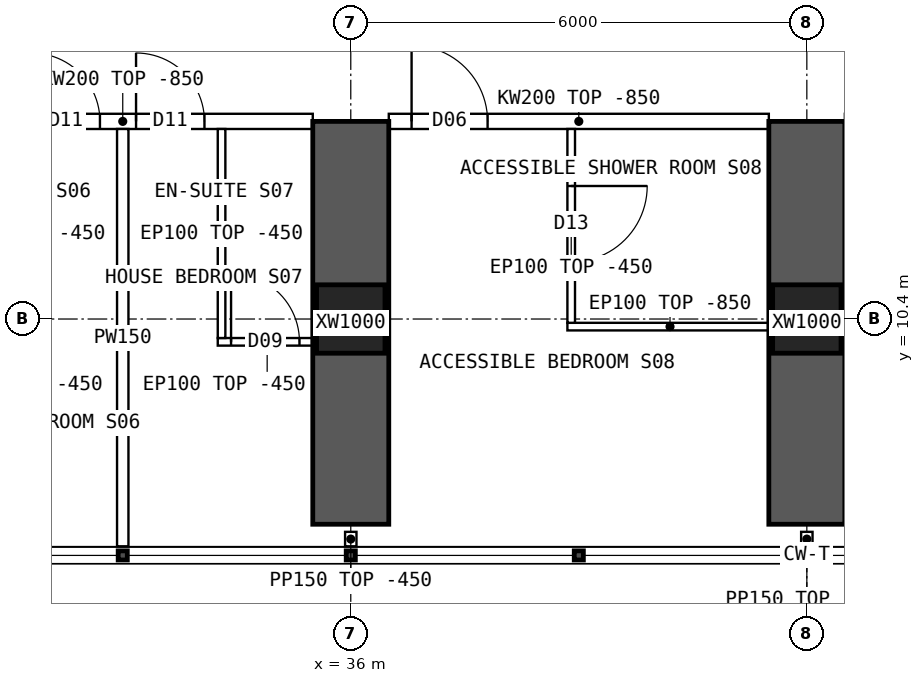
"""IFC4 building model, lengths in metres.
Left out: names, types, materials, properties, quantities, classifications, styles, units other than length and angle.
Written with IfcOpenShell. Run it as: python <this file> out.ifc"""

import sys

from ifc_helpers import new_model, si_unit, direction, frame, frame_2d, origin, origin_2d, place, context, subcontext, project, spatial, polyline, rectangle, hollow_rectangle, outline, extrude, element, fill, save


model = new_model("IFC4")
c1 = context("Model", 3, precision=1e-05, world=origin(), true_north=direction((0.0, 1.0)))
c2 = subcontext(c1, "Body", "Model", "MODEL_VIEW")
j1 = project(units=[si_unit("LENGTHUNIT", "METRE"), si_unit("PLANEANGLEUNIT", "RADIAN")], contexts=[c1])
p1 = place(None, origin())
s1 = spatial("IfcSite", under=j1, at=p1, CompositionType="ELEMENT")
p2 = place(p1, origin())
s2 = spatial("IfcBuilding", under=s1, at=p2, CompositionType="ELEMENT")
p3 = place(p2, frame((0.0, 0.0, 50.2)))
s3 = spatial("IfcBuildingStorey", under=s2, at=p3, CompositionType="ELEMENT", Elevation=50.2)
for number, where, z_axis, x_axis in (
    (1, (36.0, 10.4, 0.0), (0.0, 0.0, 1.0), (1.0, 0.0, 0.0)),
    (2, (42.0, 10.4, 0.0), (0.0, 0.0, 1.0), (1.0, 0.0, 0.0)),
):
    element("IfcColumn", number, at=place(p3, frame(where, z_axis=z_axis, x_axis=x_axis)), inside=s3, PredefinedType="COLUMN", context=c2, shape_type="SweptSolid", body=[
        extrude(hollow_rectangle(XDim=0.9, YDim=0.9, WallThickness=0.09, at=origin_2d()), origin(), (0.0, 0.0, 1.0), 3.75),
    ])
for number, where, z_axis, x_axis in (
    (3, (36.0, 7.7, 0.0), (0.0, 0.0, 1.0), (0.0, 1.0, 0.0)),
    (4, (42.0, 7.7, 0.0), (0.0, 0.0, 1.0), (0.0, 1.0, 0.0)),
):
    element("IfcWall", number, at=place(p3, frame(where, z_axis=z_axis, x_axis=x_axis)), inside=s3, PredefinedType="SHEAR", context=c2, shape_type="SweptSolid", body=[
        extrude(rectangle(XDim=5.3, YDim=1.0, at=frame_2d((2.65, 0.0))), origin(), (0.0, 0.0, 1.0), 3.75),
    ])
p4 = place(p3, frame((30.5, 13.0, 0.0), z_axis=(0.0, 0.0, 1.0), x_axis=(1.0, 0.0, 0.0)))
e5 = element("IfcWall", 5, at=p4, inside=s3, PredefinedType="SOLIDWALL", context=c2, shape_type="SweptSolid", body=[
    extrude(outline(polyline([(0.0, 0.0), (5.0, 0.0), (5.0, 2.9), (0.0, 2.9), (0.0, 0.0)])), frame((0.0, 0.1, 0.0), z_axis=(0.0, -1.0, 0.0), x_axis=(1.0, 0.0, 0.0)), (0.0, 0.0, 1.0), 0.2),
])
p5 = place(p4, frame((1.3, 0.0, 0.0)))
e6 = element("IfcOpeningElement", 6, at=p5, cuts=e5, PredefinedType="OPENING", context=c2, shape_type="SweptSolid", body=[
    extrude(rectangle(XDim=0.9, YDim=2.1, at=frame_2d((0.45, 1.05))), frame((0.0, 0.11, 0.0), z_axis=(0.0, -1.0, 0.0), x_axis=(1.0, 0.0, 0.0)), (0.0, 0.0, 1.0), 0.22),
])
p6 = place(p4, frame((2.675, 0.0, 0.0)))
e7 = element("IfcOpeningElement", 7, at=p6, cuts=e5, PredefinedType="OPENING", context=c2, shape_type="SweptSolid", body=[
    extrude(rectangle(XDim=0.9, YDim=2.1, at=frame_2d((0.45, 1.05))), frame((0.0, 0.11, 0.0), z_axis=(0.0, -1.0, 0.0), x_axis=(1.0, 0.0, 0.0)), (0.0, 0.0, 1.0), 0.22),
])
p7 = place(p3, frame((36.5, 13.0, 0.0), z_axis=(0.0, 0.0, 1.0), x_axis=(1.0, 0.0, 0.0)))
e8 = element("IfcWall", 8, at=p7, inside=s3, PredefinedType="SOLIDWALL", context=c2, shape_type="SweptSolid", body=[
    extrude(outline(polyline([(0.0, 0.0), (5.0, 0.0), (5.0, 2.9), (0.0, 2.9), (0.0, 0.0)])), frame((0.0, 0.1, 0.0), z_axis=(0.0, -1.0, 0.0), x_axis=(1.0, 0.0, 0.0)), (0.0, 0.0, 1.0), 0.2),
])
p8 = place(p7, frame((0.3, 0.0, 0.0)))
e9 = element("IfcOpeningElement", 9, at=p8, cuts=e8, PredefinedType="OPENING", context=c2, shape_type="SweptSolid", body=[
    extrude(rectangle(XDim=1.0, YDim=2.1, at=frame_2d((0.5, 1.05))), frame((0.0, 0.11, 0.0), z_axis=(0.0, -1.0, 0.0), x_axis=(1.0, 0.0, 0.0)), (0.0, 0.0, 1.0), 0.22),
])
p9 = place(p3, frame((33.0, 7.41, 0.0), z_axis=(0.0, 0.0, 1.0), x_axis=(0.0, 1.0, 0.0)))
e10 = element("IfcWall", 10, at=p9, inside=s3, PredefinedType="PARTITIONING", context=c2, shape_type="SweptSolid", body=[
    extrude(outline(polyline([(0.0, 0.0), (5.49, 0.0), (5.49, 2.9), (5.442, 2.9), (5.44, 3.3), (3.192, 3.3), (3.19, 2.9), (2.792, 2.9), (2.79, 3.3), (0.0, 3.3), (0.0, 0.0)])), frame((0.0, 0.075, 0.0), z_axis=(0.0, -1.0, 0.0), x_axis=(1.0, 0.0, 0.0)), (0.0, 0.0, 1.0), 0.15),
])
p10 = place(p3, frame((35.55, 10.1, 0.0), z_axis=(0.0, 0.0, 1.0), x_axis=(-1.0, 0.0, 0.0)))
e11 = element("IfcWall", 11, at=p10, inside=s3, PredefinedType="PARTITIONING", context=c2, shape_type="SweptSolid", body=[
    extrude(rectangle(XDim=1.3, YDim=0.1, at=frame_2d((0.65, 0.0))), origin(), (0.0, 0.0, 1.0), 3.3),
])
p11 = place(p10, frame((0.225, 0.0, 0.0)))
e12 = element("IfcOpeningElement", 12, at=p11, cuts=e11, PredefinedType="OPENING", context=c2, shape_type="SweptSolid", body=[
    extrude(rectangle(XDim=0.9, YDim=2.1, at=frame_2d((0.45, 1.05))), frame((0.0, 0.06, 0.0), z_axis=(0.0, -1.0, 0.0), x_axis=(1.0, 0.0, 0.0)), (0.0, 0.0, 1.0), 0.12),
])
p12 = place(p3, frame((34.3, 10.15, 0.0), z_axis=(0.0, 0.0, 1.0), x_axis=(0.0, 1.0, 0.0)))
e13 = element("IfcWall", 13, at=p12, inside=s3, PredefinedType="PARTITIONING", context=c2, shape_type="SweptSolid", body=[
    extrude(outline(polyline([(0.0, 0.0), (2.75, 0.0), (2.75, 2.9), (2.702, 2.9), (2.7, 3.3), (0.452, 3.3), (0.45, 2.9), (0.052, 2.9), (0.05, 3.3), (0.0, 3.3), (0.0, 0.0)])), frame((0.0, 0.05, 0.0), z_axis=(0.0, -1.0, 0.0), x_axis=(1.0, 0.0, 0.0)), (0.0, 0.0, 1.0), 0.1),
])
p13 = place(p3, frame((38.85, 10.3, 0.0), z_axis=(0.0, 0.0, 1.0), x_axis=(1.0, 0.0, 0.0)))
e14 = element("IfcWall", 14, at=p13, inside=s3, PredefinedType="PARTITIONING", context=c2, shape_type="SweptSolid", body=[
    extrude(outline(polyline([(0.0, 0.0), (2.7, 0.0), (2.7, 2.9), (0.0, 2.9), (0.0, 0.0)])), frame((0.0, 0.05, 0.0), z_axis=(0.0, -1.0, 0.0), x_axis=(1.0, 0.0, 0.0)), (0.0, 0.0, 1.0), 0.1),
])
p14 = place(p3, frame((38.9, 10.35, 0.0), z_axis=(0.0, 0.0, 1.0), x_axis=(0.0, 1.0, 0.0)))
e15 = element("IfcWall", 15, at=p14, inside=s3, PredefinedType="PARTITIONING", context=c2, shape_type="SweptSolid", body=[
    extrude(outline(polyline([(0.0, 0.0), (2.55, 0.0), (2.55, 2.9), (2.502, 2.9), (2.5, 3.3), (0.252, 3.3), (0.25, 2.9), (0.0, 2.9), (0.0, 0.0)])), frame((0.0, 0.05, 0.0), z_axis=(0.0, -1.0, 0.0), x_axis=(1.0, 0.0, 0.0)), (0.0, 0.0, 1.0), 0.1),
])
p15 = place(p14, frame((0.8, 0.0, 0.0)))
e16 = element("IfcOpeningElement", 16, at=p15, cuts=e15, PredefinedType="OPENING", context=c2, shape_type="SweptSolid", body=[
    extrude(rectangle(XDim=1.0, YDim=2.1, at=frame_2d((0.5, 1.05))), frame((0.0, 0.06, 0.0), z_axis=(0.0, -1.0, 0.0), x_axis=(1.0, 0.0, 0.0)), (0.0, 0.0, 1.0), 0.12),
])
for number, where, z_axis, x_axis in (
    (17, (36.0, 7.6, 0.0), (0.0, 0.0, 1.0), (0.0, -1.0, 0.0)),
    (18, (42.0, 7.6, 0.0), (0.0, 0.0, 1.0), (0.0, -1.0, 0.0)),
):
    element("IfcWall", number, at=place(p3, frame(where, z_axis=z_axis, x_axis=x_axis)), inside=s3, PredefinedType="PARTITIONING", context=c2, shape_type="SweptSolid", body=[
        extrude(rectangle(XDim=0.19, YDim=0.15, at=frame_2d((0.095, 0.0))), origin(), (0.0, 0.0, 1.0), 3.3),
    ])
p16 = place(p5, origin())
e19 = element("IfcDoor", 19, at=p16, inside=s3, OperationType="SINGLE_SWING_LEFT", PredefinedType="DOOR", context=c2, shape_type="SweptSolid", body=[
    extrude(rectangle(XDim=0.9, YDim=2.1, at=frame_2d((0.45, 1.05))), frame((0.0, 0.025, 0.0), z_axis=(0.0, -1.0, 0.0), x_axis=(1.0, 0.0, 0.0)), (0.0, 0.0, 1.0), 0.05),
])
fill(e6, e19)
p17 = place(p11, origin())
e20 = element("IfcDoor", 20, at=p17, inside=s3, OperationType="SINGLE_SWING_RIGHT", PredefinedType="DOOR", context=c2, shape_type="SweptSolid", body=[
    extrude(rectangle(XDim=0.9, YDim=2.1, at=frame_2d((0.45, 1.05))), frame((0.0, 0.025, 0.0), z_axis=(0.0, -1.0, 0.0), x_axis=(1.0, 0.0, 0.0)), (0.0, 0.0, 1.0), 0.05),
])
fill(e12, e20)
p18 = place(p6, origin())
e21 = element("IfcDoor", 21, at=p18, inside=s3, OperationType="SINGLE_SWING_LEFT", PredefinedType="DOOR", context=c2, shape_type="SweptSolid", body=[
    extrude(rectangle(XDim=0.9, YDim=2.1, at=frame_2d((0.45, 1.05))), frame((0.0, 0.025, 0.0), z_axis=(0.0, -1.0, 0.0), x_axis=(1.0, 0.0, 0.0)), (0.0, 0.0, 1.0), 0.05),
])
fill(e7, e21)
p19 = place(p15, origin())
e22 = element("IfcDoor", 22, at=p19, inside=s3, OperationType="SINGLE_SWING_RIGHT", PredefinedType="DOOR", context=c2, shape_type="SweptSolid", body=[
    extrude(rectangle(XDim=1.0, YDim=2.1, at=frame_2d((0.5, 1.05))), frame((0.0, 0.025, 0.0), z_axis=(0.0, -1.0, 0.0), x_axis=(1.0, 0.0, 0.0)), (0.0, 0.0, 1.0), 0.05),
])
fill(e16, e22)
p20 = place(p8, origin())
e23 = element("IfcDoor", 23, at=p20, inside=s3, OperationType="SINGLE_SWING_LEFT", PredefinedType="DOOR", context=c2, shape_type="SweptSolid", body=[
    extrude(rectangle(XDim=1.0, YDim=2.1, at=frame_2d((0.5, 1.05))), frame((0.0, 0.025, 0.0), z_axis=(0.0, -1.0, 0.0), x_axis=(1.0, 0.0, 0.0)), (0.0, 0.0, 1.0), 0.05),
])
fill(e9, e23)
save(model, sys.argv[1])
